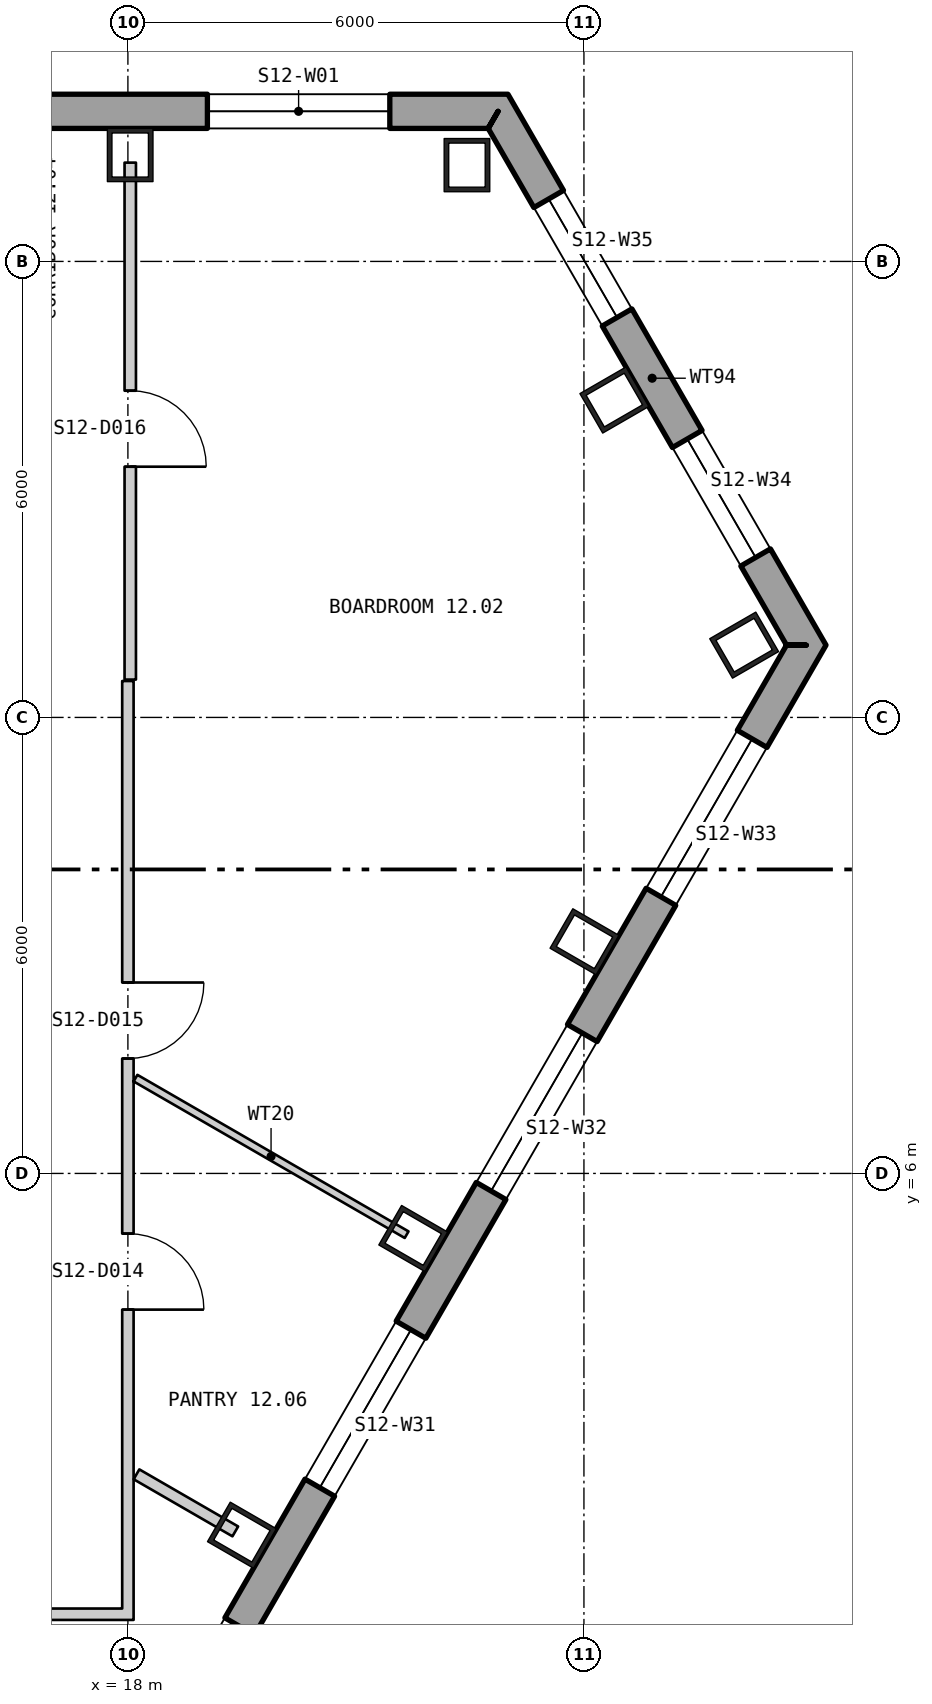
"""IFC4 building model, lengths in metres.
Left out: names, types, materials, properties, quantities, classifications, styles, units other than length and angle.
Written with IfcOpenShell. Run it as: python <this file> out.ifc"""

import sys

from ifc_helpers import new_model, si_unit, direction, frame, frame_2d, origin, origin_2d, place, context, subcontext, project, spatial, polyline, rectangle, hollow_rectangle, outline, extrude, element, fill, save


model = new_model("IFC4")
c1 = context("Model", 3, precision=1e-05, world=origin(), true_north=direction((0.0, 1.0)))
c2 = subcontext(c1, "Body", "Model", "MODEL_VIEW")
j1 = project(units=[si_unit("LENGTHUNIT", "METRE"), si_unit("PLANEANGLEUNIT", "RADIAN")], contexts=[c1])
p1 = place(None, origin())
s1 = spatial("IfcSite", under=j1, at=p1, CompositionType="ELEMENT")
p2 = place(p1, origin())
s2 = spatial("IfcBuilding", under=s1, at=p2, CompositionType="ELEMENT")
p3 = place(p2, frame((0.0, 0.0, 163.2)))
s3 = spatial("IfcBuildingStorey", under=s2, at=p3, CompositionType="ELEMENT", Elevation=163.2)
for number, where, z_axis, x_axis in (
    (1, (22.461, 19.267, 0.0), (0.0, 0.0, 1.0), (-1.0, 0.0, 0.0)),
    (2, (18.03, 19.4, 0.0), (0.0, 0.0, 1.0), (-1.0, 0.0, 0.0)),
    (3, (19.5, 1.24, 0.0), (0.0, 0.0, 1.0), (0.5, 0.866, 0.0)),
    (4, (21.754, 5.144, 0.0), (0.0, 0.0, 1.0), (0.5, 0.866, 0.0)),
    (5, (24.007, 9.048, 0.0), (0.0, 0.0, 1.0), (0.5, 0.866, 0.0)),
    (6, (26.108, 12.951, 0.0), (0.0, 0.0, 1.0), (-0.5, 0.866, 0.0)),
    (7, (24.4, 16.176, 0.0), (0.0, 0.0, 1.0), (-0.5, 0.866, 0.0)),
):
    element("IfcColumn", number, at=place(p3, frame(where, z_axis=z_axis, x_axis=x_axis)), inside=s3, PredefinedType="COLUMN", context=c2, shape_type="SweptSolid", body=[
        extrude(hollow_rectangle(XDim=0.6, YDim=0.7, WallThickness=0.06, at=origin_2d()), origin(), (0.0, 0.0, 1.0), 3.9),
    ])
p4 = place(p3, frame((22.87, 19.975, -0.4), z_axis=(0.0, 0.0, 1.0), x_axis=(-1.0, 0.0, 0.0)))
e8 = element("IfcWall", 8, at=p4, inside=s3, PredefinedType="SOLIDWALL", context=c2, shape_type="SweptSolid", body=[
    extrude(outline(polyline([(-0.13, -0.225), (45.87, -0.225), (45.61, 0.225), (0.13, 0.225), (-0.13, -0.225)])), origin(), (0.0, 0.0, 1.0), 3.9),
])
p5 = place(p4, frame((1.424, 0.0, 1.3)))
e9 = element("IfcOpeningElement", 9, at=p5, cuts=e8, PredefinedType="OPENING", context=c2, shape_type="SweptSolid", body=[
    extrude(rectangle(XDim=2.4, YDim=2.0, at=frame_2d((1.2, 1.0))), frame((0.0, 0.235, 0.0), z_axis=(0.0, -1.0, 0.0), x_axis=(1.0, 0.0, 0.0)), (0.0, 0.0, 1.0), 0.47),
])
p6 = place(p4, frame((10.401, 0.0, 1.3)))
e10 = element("IfcOpeningElement", 10, at=p6, cuts=e8, PredefinedType="OPENING", context=c2, shape_type="SweptSolid", body=[
    extrude(rectangle(XDim=2.4, YDim=2.0, at=frame_2d((1.2, 1.0))), frame((0.0, 0.235, 0.0), z_axis=(0.0, -1.0, 0.0), x_axis=(1.0, 0.0, 0.0)), (0.0, 0.0, 1.0), 0.47),
])
p7 = place(p4, frame((14.909, 0.0, 1.3)))
e11 = element("IfcOpeningElement", 11, at=p7, cuts=e8, PredefinedType="OPENING", context=c2, shape_type="SweptSolid", body=[
    extrude(rectangle(XDim=2.4, YDim=2.0, at=frame_2d((1.2, 1.0))), frame((0.0, 0.235, 0.0), z_axis=(0.0, -1.0, 0.0), x_axis=(1.0, 0.0, 0.0)), (0.0, 0.0, 1.0), 0.47),
])
p8 = place(p4, frame((19.416, 0.0, 1.3)))
e12 = element("IfcOpeningElement", 12, at=p8, cuts=e8, PredefinedType="OPENING", context=c2, shape_type="SweptSolid", body=[
    extrude(rectangle(XDim=2.4, YDim=2.0, at=frame_2d((1.2, 1.0))), frame((0.0, 0.235, 0.0), z_axis=(0.0, -1.0, 0.0), x_axis=(1.0, 0.0, 0.0)), (0.0, 0.0, 1.0), 0.47),
])
p9 = place(p4, frame((23.924, 0.0, 1.3)))
e13 = element("IfcOpeningElement", 13, at=p9, cuts=e8, PredefinedType="OPENING", context=c2, shape_type="SweptSolid", body=[
    extrude(rectangle(XDim=2.4, YDim=2.0, at=frame_2d((1.2, 1.0))), frame((0.0, 0.235, 0.0), z_axis=(0.0, -1.0, 0.0), x_axis=(1.0, 0.0, 0.0)), (0.0, 0.0, 1.0), 0.47),
])
p10 = place(p4, frame((28.431, 0.0, 1.3)))
e14 = element("IfcOpeningElement", 14, at=p10, cuts=e8, PredefinedType="OPENING", context=c2, shape_type="SweptSolid", body=[
    extrude(rectangle(XDim=2.4, YDim=2.0, at=frame_2d((1.2, 1.0))), frame((0.0, 0.235, 0.0), z_axis=(0.0, -1.0, 0.0), x_axis=(1.0, 0.0, 0.0)), (0.0, 0.0, 1.0), 0.47),
])
p11 = place(p4, frame((32.939, 0.0, 1.3)))
e15 = element("IfcOpeningElement", 15, at=p11, cuts=e8, PredefinedType="OPENING", context=c2, shape_type="SweptSolid", body=[
    extrude(rectangle(XDim=2.4, YDim=2.0, at=frame_2d((1.2, 1.0))), frame((0.0, 0.235, 0.0), z_axis=(0.0, -1.0, 0.0), x_axis=(1.0, 0.0, 0.0)), (0.0, 0.0, 1.0), 0.47),
])
p12 = place(p4, frame((37.447, 0.0, 1.3)))
e16 = element("IfcOpeningElement", 16, at=p12, cuts=e8, PredefinedType="OPENING", context=c2, shape_type="SweptSolid", body=[
    extrude(rectangle(XDim=2.4, YDim=2.0, at=frame_2d((1.2, 1.0))), frame((0.0, 0.235, 0.0), z_axis=(0.0, -1.0, 0.0), x_axis=(1.0, 0.0, 0.0)), (0.0, 0.0, 1.0), 0.47),
])
p13 = place(p4, frame((41.916, 0.0, 1.3)))
e17 = element("IfcOpeningElement", 17, at=p13, cuts=e8, PredefinedType="OPENING", context=c2, shape_type="SweptSolid", body=[
    extrude(rectangle(XDim=2.4, YDim=2.0, at=frame_2d((1.2, 1.0))), frame((0.0, 0.235, 0.0), z_axis=(0.0, -1.0, 0.0), x_axis=(1.0, 0.0, 0.0)), (0.0, 0.0, 1.0), 0.47),
])
p14 = place(p3, frame((4.055, -26.661, -0.18), z_axis=(0.0, 0.0, 1.0), x_axis=(0.499999764979, 0.866025539474, 0.0)))
e18 = element("IfcWall", 18, at=p14, inside=s3, PredefinedType="SOLIDWALL", context=c2, shape_type="SweptSolid", body=[
    extrude(outline(polyline([(-0.13, -0.225), (45.87, -0.225), (45.61, 0.225), (0.13, 0.225), (-0.13, -0.225)])), origin(), (0.0, 0.0, 1.0), 3.68),
])
p15 = place(p14, frame((1.424, 0.0, 1.08)))
e19 = element("IfcOpeningElement", 19, at=p15, cuts=e18, PredefinedType="OPENING", context=c2, shape_type="SweptSolid", body=[
    extrude(rectangle(XDim=2.4, YDim=2.0, at=frame_2d((1.2, 1.0))), frame((0.0, 0.235, 0.0), z_axis=(0.0, -1.0, 0.0), x_axis=(1.0, 0.0, 0.0)), (0.0, 0.0, 1.0), 0.47),
])
p16 = place(p14, frame((5.893, 0.0, 1.08)))
e20 = element("IfcOpeningElement", 20, at=p16, cuts=e18, PredefinedType="OPENING", context=c2, shape_type="SweptSolid", body=[
    extrude(rectangle(XDim=2.4, YDim=2.0, at=frame_2d((1.2, 1.0))), frame((0.0, 0.235, 0.0), z_axis=(0.0, -1.0, 0.0), x_axis=(1.0, 0.0, 0.0)), (0.0, 0.0, 1.0), 0.47),
])
p17 = place(p14, frame((10.401, 0.0, 1.08)))
e21 = element("IfcOpeningElement", 21, at=p17, cuts=e18, PredefinedType="OPENING", context=c2, shape_type="SweptSolid", body=[
    extrude(rectangle(XDim=2.4, YDim=2.0, at=frame_2d((1.2, 1.0))), frame((0.0, 0.235, 0.0), z_axis=(0.0, -1.0, 0.0), x_axis=(1.0, 0.0, 0.0)), (0.0, 0.0, 1.0), 0.47),
])
p18 = place(p14, frame((14.909, 0.0, 1.08)))
e22 = element("IfcOpeningElement", 22, at=p18, cuts=e18, PredefinedType="OPENING", context=c2, shape_type="SweptSolid", body=[
    extrude(rectangle(XDim=2.4, YDim=2.0, at=frame_2d((1.2, 1.0))), frame((0.0, 0.235, 0.0), z_axis=(0.0, -1.0, 0.0), x_axis=(1.0, 0.0, 0.0)), (0.0, 0.0, 1.0), 0.47),
])
p19 = place(p14, frame((19.416, 0.0, 1.08)))
e23 = element("IfcOpeningElement", 23, at=p19, cuts=e18, PredefinedType="OPENING", context=c2, shape_type="SweptSolid", body=[
    extrude(rectangle(XDim=2.4, YDim=2.0, at=frame_2d((1.2, 1.0))), frame((0.0, 0.235, 0.0), z_axis=(0.0, -1.0, 0.0), x_axis=(1.0, 0.0, 0.0)), (0.0, 0.0, 1.0), 0.47),
])
p20 = place(p14, frame((23.924, 0.0, 1.08)))
e24 = element("IfcOpeningElement", 24, at=p20, cuts=e18, PredefinedType="OPENING", context=c2, shape_type="SweptSolid", body=[
    extrude(rectangle(XDim=2.4, YDim=2.0, at=frame_2d((1.2, 1.0))), frame((0.0, 0.235, 0.0), z_axis=(0.0, -1.0, 0.0), x_axis=(1.0, 0.0, 0.0)), (0.0, 0.0, 1.0), 0.47),
])
p21 = place(p14, frame((28.431, 0.0, 1.08)))
e25 = element("IfcOpeningElement", 25, at=p21, cuts=e18, PredefinedType="OPENING", context=c2, shape_type="SweptSolid", body=[
    extrude(rectangle(XDim=2.4, YDim=2.0, at=frame_2d((1.2, 1.0))), frame((0.0, 0.235, 0.0), z_axis=(0.0, -1.0, 0.0), x_axis=(1.0, 0.0, 0.0)), (0.0, 0.0, 1.0), 0.47),
])
p22 = place(p14, frame((32.939, 0.0, 1.08)))
e26 = element("IfcOpeningElement", 26, at=p22, cuts=e18, PredefinedType="OPENING", context=c2, shape_type="SweptSolid", body=[
    extrude(rectangle(XDim=2.4, YDim=2.0, at=frame_2d((1.2, 1.0))), frame((0.0, 0.235, 0.0), z_axis=(0.0, -1.0, 0.0), x_axis=(1.0, 0.0, 0.0)), (0.0, 0.0, 1.0), 0.47),
])
p23 = place(p14, frame((37.447, 0.0, 1.08)))
e27 = element("IfcOpeningElement", 27, at=p23, cuts=e18, PredefinedType="OPENING", context=c2, shape_type="SweptSolid", body=[
    extrude(rectangle(XDim=2.4, YDim=2.0, at=frame_2d((1.2, 1.0))), frame((0.0, 0.235, 0.0), z_axis=(0.0, -1.0, 0.0), x_axis=(1.0, 0.0, 0.0)), (0.0, 0.0, 1.0), 0.47),
])
p24 = place(p14, frame((41.916, 0.0, 1.08)))
e28 = element("IfcOpeningElement", 28, at=p24, cuts=e18, PredefinedType="OPENING", context=c2, shape_type="SweptSolid", body=[
    extrude(rectangle(XDim=2.4, YDim=2.0, at=frame_2d((1.2, 1.0))), frame((0.0, 0.235, 0.0), z_axis=(0.0, -1.0, 0.0), x_axis=(1.0, 0.0, 0.0)), (0.0, 0.0, 1.0), 0.47),
])
p25 = place(p3, frame((26.925, 12.951, -0.4), z_axis=(0.0, 0.0, 1.0), x_axis=(-0.500002094529, 0.866024194504, 0.0)))
e29 = element("IfcWall", 29, at=p25, inside=s3, PredefinedType="SOLIDWALL", context=c2, shape_type="SweptSolid", body=[
    extrude(outline(polyline([(-0.13, -0.225), (8.24, -0.225), (7.98, 0.225), (0.13, 0.225), (-0.13, -0.225)])), origin(), (0.0, 0.0, 1.0), 3.9),
])
p26 = place(p25, frame((1.332, 0.0, 1.3)))
e30 = element("IfcOpeningElement", 30, at=p26, cuts=e29, PredefinedType="OPENING", context=c2, shape_type="SweptSolid", body=[
    extrude(rectangle(XDim=1.8, YDim=2.0, at=frame_2d((0.9, 1.0))), frame((0.0, 0.235, 0.0), z_axis=(0.0, -1.0, 0.0), x_axis=(1.0, 0.0, 0.0)), (0.0, 0.0, 1.0), 0.47),
])
p27 = place(p25, frame((4.978, 0.0, 1.3)))
e31 = element("IfcOpeningElement", 31, at=p27, cuts=e29, PredefinedType="OPENING", context=c2, shape_type="SweptSolid", body=[
    extrude(rectangle(XDim=1.8, YDim=2.0, at=frame_2d((0.9, 1.0))), frame((0.0, 0.235, 0.0), z_axis=(0.0, -1.0, 0.0), x_axis=(1.0, 0.0, 0.0)), (0.0, 0.0, 1.0), 0.47),
])
p28 = place(p3, frame((7.09, 0.2, 0.0), z_axis=(0.0, 0.0, 1.0), x_axis=(1.0, 0.0, 0.0)))
e32 = element("IfcWall", 32, at=p28, inside=s3, PredefinedType="PARTITIONING", context=c2, shape_type="SweptSolid", body=[
    extrude(rectangle(XDim=10.835, YDim=0.15, at=frame_2d((5.418, 0.0))), origin(), (0.0, 0.0, 1.0), 3.7),
])
p29 = place(p3, frame((18.0, 0.125, 0.0), z_axis=(0.0, 0.0, 1.0), x_axis=(0.0, 1.0, 0.0)))
e33 = element("IfcWall", 33, at=p29, inside=s3, PredefinedType="PARTITIONING", context=c2, shape_type="SweptSolid", body=[
    extrude(rectangle(XDim=12.354, YDim=0.15, at=frame_2d((6.177, 0.0))), origin(), (0.0, 0.0, 1.0), 3.7),
])
p30 = place(p29, frame((4.083, 0.0, 0.0)))
e34 = element("IfcOpeningElement", 34, at=p30, cuts=e33, PredefinedType="OPENING", context=c2, shape_type="SweptSolid", body=[
    extrude(rectangle(XDim=1.0, YDim=2.1, at=frame_2d((0.5, 1.05))), frame((0.0, 0.085, 0.0), z_axis=(0.0, -1.0, 0.0), x_axis=(1.0, 0.0, 0.0)), (0.0, 0.0, 1.0), 0.17),
])
p31 = place(p29, frame((7.387, 0.0, 0.0)))
e35 = element("IfcOpeningElement", 35, at=p31, cuts=e33, PredefinedType="OPENING", context=c2, shape_type="SweptSolid", body=[
    extrude(rectangle(XDim=1.0, YDim=2.1, at=frame_2d((0.5, 1.05))), frame((0.0, 0.085, 0.0), z_axis=(0.0, -1.0, 0.0), x_axis=(1.0, 0.0, 0.0)), (0.0, 0.0, 1.0), 0.17),
])
p32 = place(p3, frame((18.031, 12.498, 0.0), z_axis=(0.0, 0.0, 1.0), x_axis=(0.0, 1.0, 0.0)))
e36 = element("IfcWall", 36, at=p32, inside=s3, PredefinedType="PARTITIONING", context=c2, shape_type="SweptSolid", body=[
    extrude(rectangle(XDim=6.802, YDim=0.15, at=frame_2d((3.401, 0.0))), origin(), (0.0, 0.0, 1.0), 3.7),
])
p33 = place(p32, frame((2.801, 0.0, 0.0)))
e37 = element("IfcOpeningElement", 37, at=p33, cuts=e36, PredefinedType="OPENING", context=c2, shape_type="SweptSolid", body=[
    extrude(rectangle(XDim=1.0, YDim=2.1, at=frame_2d((0.5, 1.05))), frame((0.0, 0.085, 0.0), z_axis=(0.0, -1.0, 0.0), x_axis=(1.0, 0.0, 0.0)), (0.0, 0.0, 1.0), 0.17),
])
p34 = place(p3, frame((18.1, 7.254, 0.0), z_axis=(0.0, 0.0, 1.0), x_axis=(0.865963207503, -0.50010771165, 0.0)))
e38 = element("IfcWall", 38, at=p34, inside=s3, PredefinedType="PARTITIONING", context=c2, shape_type="SweptSolid", body=[
    extrude(rectangle(XDim=4.119, YDim=0.1, at=frame_2d((2.06, 0.0))), origin(), (0.0, 0.0, 1.0), 3.7),
])
p35 = place(p3, frame((18.113, 2.041, 0.0), z_axis=(0.0, 0.0, 1.0), x_axis=(0.865897129857, -0.500222111171, 0.0)))
e39 = element("IfcWall", 39, at=p35, inside=s3, PredefinedType="PARTITIONING", context=c2, shape_type="SweptSolid", body=[
    extrude(rectangle(XDim=1.501, YDim=0.15, at=frame_2d((0.751, 0.0))), origin(), (0.0, 0.0, 1.0), 3.7),
])
p36 = place(p5, origin())
e40 = element("IfcWindow", 40, at=p36, inside=s3, PartitioningType="SINGLE_PANEL", PredefinedType="WINDOW", context=c2, shape_type="SweptSolid", body=[
    extrude(rectangle(XDim=2.4, YDim=2.0, at=frame_2d((1.2, 1.0))), frame((0.0, 0.105, 0.0), z_axis=(0.0, -1.0, 0.0), x_axis=(1.0, 0.0, 0.0)), (0.0, 0.0, 1.0), 0.06),
])
fill(e9, e40)
p37 = place(p21, origin())
e41 = element("IfcWindow", 41, at=p37, inside=s3, PartitioningType="SINGLE_PANEL", PredefinedType="WINDOW", context=c2, shape_type="SweptSolid", body=[
    extrude(rectangle(XDim=2.4, YDim=2.0, at=frame_2d((1.2, 1.0))), frame((0.0, 0.105, 0.0), z_axis=(0.0, -1.0, 0.0), x_axis=(1.0, 0.0, 0.0)), (0.0, 0.0, 1.0), 0.06),
])
fill(e25, e41)
p38 = place(p22, origin())
e42 = element("IfcWindow", 42, at=p38, inside=s3, PartitioningType="SINGLE_PANEL", PredefinedType="WINDOW", context=c2, shape_type="SweptSolid", body=[
    extrude(rectangle(XDim=2.4, YDim=2.0, at=frame_2d((1.2, 1.0))), frame((0.0, 0.105, 0.0), z_axis=(0.0, -1.0, 0.0), x_axis=(1.0, 0.0, 0.0)), (0.0, 0.0, 1.0), 0.06),
])
fill(e26, e42)
p39 = place(p23, origin())
e43 = element("IfcWindow", 43, at=p39, inside=s3, PartitioningType="SINGLE_PANEL", PredefinedType="WINDOW", context=c2, shape_type="SweptSolid", body=[
    extrude(rectangle(XDim=2.4, YDim=2.0, at=frame_2d((1.2, 1.0))), frame((0.0, 0.105, 0.0), z_axis=(0.0, -1.0, 0.0), x_axis=(1.0, 0.0, 0.0)), (0.0, 0.0, 1.0), 0.06),
])
fill(e27, e43)
p40 = place(p24, origin())
e44 = element("IfcWindow", 44, at=p40, inside=s3, PartitioningType="SINGLE_PANEL", PredefinedType="WINDOW", context=c2, shape_type="SweptSolid", body=[
    extrude(rectangle(XDim=2.4, YDim=2.0, at=frame_2d((1.2, 1.0))), frame((0.0, 0.105, 0.0), z_axis=(0.0, -1.0, 0.0), x_axis=(1.0, 0.0, 0.0)), (0.0, 0.0, 1.0), 0.06),
])
fill(e28, e44)
p41 = place(p26, origin())
e45 = element("IfcWindow", 45, at=p41, inside=s3, PartitioningType="SINGLE_PANEL", PredefinedType="WINDOW", context=c2, shape_type="SweptSolid", body=[
    extrude(rectangle(XDim=1.8, YDim=2.0, at=frame_2d((0.9, 1.0))), frame((0.0, 0.105, 0.0), z_axis=(0.0, -1.0, 0.0), x_axis=(1.0, 0.0, 0.0)), (0.0, 0.0, 1.0), 0.06),
])
fill(e30, e45)
p42 = place(p27, origin())
e46 = element("IfcWindow", 46, at=p42, inside=s3, PartitioningType="SINGLE_PANEL", PredefinedType="WINDOW", context=c2, shape_type="SweptSolid", body=[
    extrude(rectangle(XDim=1.8, YDim=2.0, at=frame_2d((0.9, 1.0))), frame((0.0, 0.105, 0.0), z_axis=(0.0, -1.0, 0.0), x_axis=(1.0, 0.0, 0.0)), (0.0, 0.0, 1.0), 0.06),
])
fill(e31, e46)
p43 = place(p30, origin())
e47 = element("IfcDoor", 47, at=p43, inside=s3, OperationType="SINGLE_SWING_LEFT", PredefinedType="DOOR", context=c2, shape_type="SweptSolid", body=[
    extrude(rectangle(XDim=1.0, YDim=2.1, at=frame_2d((0.5, 1.05))), frame((0.0, 0.025, 0.0), z_axis=(0.0, -1.0, 0.0), x_axis=(1.0, 0.0, 0.0)), (0.0, 0.0, 1.0), 0.05),
])
fill(e34, e47)
p44 = place(p31, origin())
e48 = element("IfcDoor", 48, at=p44, inside=s3, OperationType="SINGLE_SWING_RIGHT", PredefinedType="DOOR", context=c2, shape_type="SweptSolid", body=[
    extrude(rectangle(XDim=1.0, YDim=2.1, at=frame_2d((0.5, 1.05))), frame((0.0, 0.025, 0.0), z_axis=(0.0, -1.0, 0.0), x_axis=(1.0, 0.0, 0.0)), (0.0, 0.0, 1.0), 0.05),
])
fill(e35, e48)
p45 = place(p33, origin())
e49 = element("IfcDoor", 49, at=p45, inside=s3, OperationType="SINGLE_SWING_LEFT", PredefinedType="DOOR", context=c2, shape_type="SweptSolid", body=[
    extrude(rectangle(XDim=1.0, YDim=2.1, at=frame_2d((0.5, 1.05))), frame((0.0, 0.025, 0.0), z_axis=(0.0, -1.0, 0.0), x_axis=(1.0, 0.0, 0.0)), (0.0, 0.0, 1.0), 0.05),
])
fill(e37, e49)
save(model, sys.argv[1])
